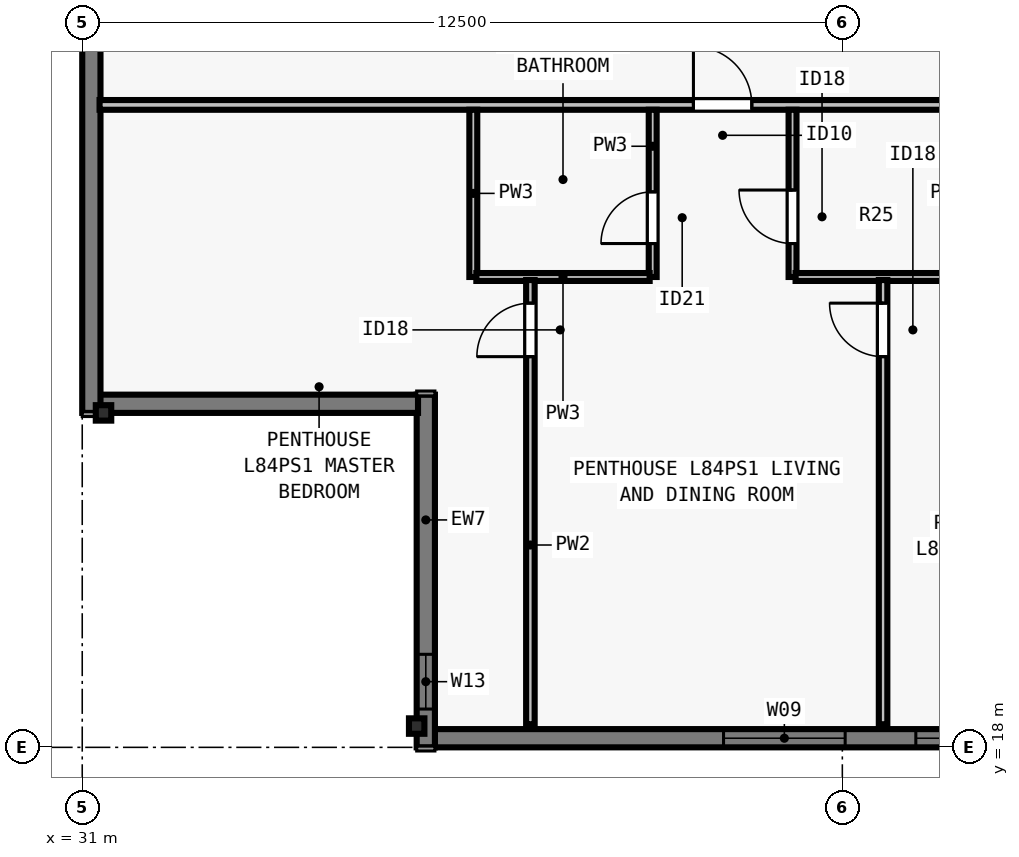
"""IFC4 building model, lengths in metres.
Left out: names, types, materials, properties, quantities, classifications, styles, units other than length and angle.
Written with IfcOpenShell. Run it as: python <this file> out.ifc"""

import sys

from ifc_helpers import new_model, si_unit, direction, frame, frame_2d, origin, origin_2d, place, context, subcontext, project, spatial, rectangle, i_section, extrude, element, fill, save


model = new_model("IFC4")
c1 = context("Model", 3, precision=1e-05, world=origin(), true_north=direction((0.0, 1.0)))
c2 = subcontext(c1, "Body", "Model", "MODEL_VIEW")
j1 = project(units=[si_unit("LENGTHUNIT", "METRE"), si_unit("PLANEANGLEUNIT", "RADIAN")], contexts=[c1])
p1 = place(None, origin())
s1 = spatial("IfcSite", under=j1, at=p1, CompositionType="ELEMENT")
p2 = place(p1, origin())
s2 = spatial("IfcBuilding", under=s1, at=p2, CompositionType="ELEMENT")
p3 = place(p2, frame((0.0, 0.0, 305.0)))
s3 = spatial("IfcBuildingStorey", under=s2, at=p3, CompositionType="ELEMENT", Elevation=305.0)
for number, where, z_axis, x_axis in (
    (1, (36.5, 18.35, 0.0), (0.0, 0.0, 1.0), (1.0, 0.0, 0.0)),
    (2, (31.35, 23.5, 0.0), (0.0, 0.0, 1.0), (0.0, 1.0, 0.0)),
):
    element("IfcColumn", number, at=place(p3, frame(where, z_axis=z_axis, x_axis=x_axis)), inside=s3, PredefinedType="COLUMN", context=c2, shape_type="SweptSolid", body=[
        extrude(i_section(OverallWidth=0.254, OverallDepth=0.254, WebThickness=0.009, FlangeThickness=0.014, FilletRadius=0.013, at=origin_2d()), origin(), (0.0, 0.0, 1.0), 3.5),
    ])
p4 = place(p3, frame((67.5, 18.15, 0.0), z_axis=(0.0, 0.0, 1.0), x_axis=(-1.0, 0.0, 0.0)))
e3 = element("IfcWall", 3, at=p4, inside=s3, PredefinedType="SOLIDWALL", context=c2, shape_type="SweptSolid", body=[
    extrude(rectangle(XDim=30.722, YDim=0.3, at=frame_2d((15.361, 0.0))), origin(), (0.0, 0.0, 1.0), 3.29),
])
p5 = place(p4, frame((4.944, 0.0, 0.8)))
e4 = element("IfcOpeningElement", 4, at=p5, cuts=e3, PredefinedType="OPENING", context=c2, shape_type="SweptSolid", body=[
    extrude(rectangle(XDim=1.65, YDim=1.758, at=frame_2d((0.825, 0.879))), frame((0.0, 0.16, 0.0), z_axis=(0.0, -1.0, 0.0), x_axis=(1.0, 0.0, 0.0)), (0.0, 0.0, 1.0), 0.32),
])
p6 = place(p4, frame((7.756, 0.0, 0.8)))
e5 = element("IfcOpeningElement", 5, at=p6, cuts=e3, PredefinedType="OPENING", context=c2, shape_type="SweptSolid", body=[
    extrude(rectangle(XDim=2.0, YDim=1.758, at=frame_2d((1.0, 0.879))), frame((0.0, 0.16, 0.0), z_axis=(0.0, -1.0, 0.0), x_axis=(1.0, 0.0, 0.0)), (0.0, 0.0, 1.0), 0.32),
])
p7 = place(p4, frame((12.617, 0.0, 0.8)))
e6 = element("IfcOpeningElement", 6, at=p7, cuts=e3, PredefinedType="OPENING", context=c2, shape_type="SweptSolid", body=[
    extrude(rectangle(XDim=1.65, YDim=1.758, at=frame_2d((0.825, 0.879))), frame((0.0, 0.16, 0.0), z_axis=(0.0, -1.0, 0.0), x_axis=(1.0, 0.0, 0.0)), (0.0, 0.0, 1.0), 0.32),
])
p8 = place(p4, frame((16.28, 0.0, 0.8)))
e7 = element("IfcOpeningElement", 7, at=p8, cuts=e3, PredefinedType="OPENING", context=c2, shape_type="SweptSolid", body=[
    extrude(rectangle(XDim=2.0, YDim=1.758, at=frame_2d((1.0, 0.879))), frame((0.0, 0.16, 0.0), z_axis=(0.0, -1.0, 0.0), x_axis=(1.0, 0.0, 0.0)), (0.0, 0.0, 1.0), 0.32),
])
p9 = place(p4, frame((21.142, 0.0, 0.8)))
e8 = element("IfcOpeningElement", 8, at=p9, cuts=e3, PredefinedType="OPENING", context=c2, shape_type="SweptSolid", body=[
    extrude(rectangle(XDim=1.65, YDim=1.758, at=frame_2d((0.825, 0.879))), frame((0.0, 0.16, 0.0), z_axis=(0.0, -1.0, 0.0), x_axis=(1.0, 0.0, 0.0)), (0.0, 0.0, 1.0), 0.32),
])
p10 = place(p4, frame((23.954, 0.0, 0.8)))
e9 = element("IfcOpeningElement", 9, at=p10, cuts=e3, PredefinedType="OPENING", context=c2, shape_type="SweptSolid", body=[
    extrude(rectangle(XDim=2.0, YDim=1.758, at=frame_2d((1.0, 0.879))), frame((0.0, 0.16, 0.0), z_axis=(0.0, -1.0, 0.0), x_axis=(1.0, 0.0, 0.0)), (0.0, 0.0, 1.0), 0.32),
])
p11 = place(p3, frame((36.65, 18.0, 0.0), z_axis=(0.0, 0.0, 1.0), x_axis=(0.0, 1.0, 0.0)))
e10 = element("IfcWall", 10, at=p11, inside=s3, PredefinedType="SOLIDWALL", context=c2, shape_type="SweptSolid", body=[
    extrude(rectangle(XDim=5.8, YDim=0.3, at=frame_2d((2.9, 0.0))), origin(), (0.0, 0.0, 1.0), 3.29),
])
p12 = place(p11, frame((0.63, 0.0, 0.8)))
e11 = element("IfcOpeningElement", 11, at=p12, cuts=e10, PredefinedType="OPENING", context=c2, shape_type="SweptSolid", body=[
    extrude(rectangle(XDim=0.9, YDim=1.75, at=frame_2d((0.45, 0.875))), frame((0.0, 0.16, 0.0), z_axis=(0.0, -1.0, 0.0), x_axis=(1.0, 0.0, 0.0)), (0.0, 0.0, 1.0), 0.32),
])
p13 = place(p3, frame((36.522, 23.65, 0.0), z_axis=(0.0, 0.0, 1.0), x_axis=(-1.0, 0.0, 0.0)))
e12 = element("IfcWall", 12, at=p13, inside=s3, PredefinedType="SOLIDWALL", context=c2, shape_type="SweptSolid", body=[
    extrude(rectangle(XDim=5.244, YDim=0.3, at=frame_2d((2.622, 0.0))), origin(), (0.0, 0.0, 1.0), 3.29),
])
p14 = place(p3, frame((31.15, 23.5, 0.0), z_axis=(0.0, 0.0, 1.0), x_axis=(0.0, 1.0, 0.0)))
e13 = element("IfcWall", 13, at=p14, inside=s3, PredefinedType="SOLIDWALL", context=c2, shape_type="SweptSolid", body=[
    extrude(rectangle(XDim=30.722, YDim=0.3, at=frame_2d((15.361, 0.0))), origin(), (0.0, 0.0, 1.0), 3.29),
])
p15 = place(p14, frame((7.756, 0.0, 0.8)))
e14 = element("IfcOpeningElement", 14, at=p15, cuts=e13, PredefinedType="OPENING", context=c2, shape_type="SweptSolid", body=[
    extrude(rectangle(XDim=2.0, YDim=1.758, at=frame_2d((1.0, 0.879))), frame((0.0, 0.16, 0.0), z_axis=(0.0, -1.0, 0.0), x_axis=(1.0, 0.0, 0.0)), (0.0, 0.0, 1.0), 0.32),
])
p16 = place(p14, frame((12.617, 0.0, 0.8)))
e15 = element("IfcOpeningElement", 15, at=p16, cuts=e13, PredefinedType="OPENING", context=c2, shape_type="SweptSolid", body=[
    extrude(rectangle(XDim=1.65, YDim=1.758, at=frame_2d((0.825, 0.879))), frame((0.0, 0.16, 0.0), z_axis=(0.0, -1.0, 0.0), x_axis=(1.0, 0.0, 0.0)), (0.0, 0.0, 1.0), 0.32),
])
p17 = place(p14, frame((16.28, 0.0, 0.8)))
e16 = element("IfcOpeningElement", 16, at=p17, cuts=e13, PredefinedType="OPENING", context=c2, shape_type="SweptSolid", body=[
    extrude(rectangle(XDim=2.0, YDim=1.758, at=frame_2d((1.0, 0.879))), frame((0.0, 0.16, 0.0), z_axis=(0.0, -1.0, 0.0), x_axis=(1.0, 0.0, 0.0)), (0.0, 0.0, 1.0), 0.32),
])
p18 = place(p14, frame((21.142, 0.0, 0.8)))
e17 = element("IfcOpeningElement", 17, at=p18, cuts=e13, PredefinedType="OPENING", context=c2, shape_type="SweptSolid", body=[
    extrude(rectangle(XDim=1.65, YDim=1.758, at=frame_2d((0.825, 0.879))), frame((0.0, 0.16, 0.0), z_axis=(0.0, -1.0, 0.0), x_axis=(1.0, 0.0, 0.0)), (0.0, 0.0, 1.0), 0.32),
])
p19 = place(p3, frame((31.285, 28.565, 0.0), z_axis=(0.0, 0.0, 1.0), x_axis=(1.0, 0.0, 0.0)))
e18 = element("IfcWall", 18, at=p19, inside=s3, PredefinedType="PARTITIONING", context=c2, shape_type="SweptSolid", body=[
    extrude(rectangle(XDim=41.43, YDim=0.16, at=frame_2d((20.715, 0.0))), origin(), (0.0, 0.0, 1.0), 3.009),
])
p20 = place(p19, frame((9.766, 0.0, 0.0)))
e19 = element("IfcOpeningElement", 19, at=p20, cuts=e18, PredefinedType="OPENING", context=c2, shape_type="SweptSolid", body=[
    extrude(rectangle(XDim=0.96, YDim=2.18, at=frame_2d((0.48, 1.09))), frame((0.0, 0.09, 0.0), z_axis=(0.0, -1.0, 0.0), x_axis=(1.0, 0.0, 0.0)), (0.0, 0.0, 1.0), 0.18),
])
p21 = place(p19, frame((30.346, 0.0, 0.0)))
e20 = element("IfcOpeningElement", 20, at=p21, cuts=e18, PredefinedType="OPENING", context=c2, shape_type="SweptSolid", body=[
    extrude(rectangle(XDim=0.96, YDim=2.18, at=frame_2d((0.48, 1.09))), frame((0.0, 0.09, 0.0), z_axis=(0.0, -1.0, 0.0), x_axis=(1.0, 0.0, 0.0)), (0.0, 0.0, 1.0), 0.18),
])
p22 = place(p3, frame((37.431, 25.735, 0.0), z_axis=(0.0, 0.0, 1.0), x_axis=(0.0, 1.0, 0.0)))
e21 = element("IfcWall", 21, at=p22, inside=s3, PredefinedType="PLUMBINGWALL", context=c2, shape_type="SweptSolid", body=[
    extrude(rectangle(XDim=2.75, YDim=0.13, at=frame_2d((1.375, 0.0))), origin(), (0.0, 0.0, 1.0), 3.29),
])
p23 = place(p3, frame((40.381, 25.735, 0.0), z_axis=(0.0, 0.0, 1.0), x_axis=(0.0, 1.0, 0.0)))
e22 = element("IfcWall", 22, at=p23, inside=s3, PredefinedType="PLUMBINGWALL", context=c2, shape_type="SweptSolid", body=[
    extrude(rectangle(XDim=2.75, YDim=0.13, at=frame_2d((1.375, 0.0))), origin(), (0.0, 0.0, 1.0), 3.29),
])
p24 = place(p23, frame((0.55, 0.0, 0.0)))
e23 = element("IfcOpeningElement", 23, at=p24, cuts=e22, PredefinedType="OPENING", context=c2, shape_type="SweptSolid", body=[
    extrude(rectangle(XDim=0.85, YDim=2.08, at=frame_2d((0.425, 1.04))), frame((0.0, 0.075, 0.0), z_axis=(0.0, -1.0, 0.0), x_axis=(1.0, 0.0, 0.0)), (0.0, 0.0, 1.0), 0.15),
])
p25 = place(p3, frame((37.481, 25.735, 0.0), z_axis=(0.0, 0.0, 1.0), x_axis=(1.0, 0.0, 0.0)))
e24 = element("IfcWall", 24, at=p25, inside=s3, PredefinedType="PLUMBINGWALL", context=c2, shape_type="SweptSolid", body=[
    extrude(rectangle(XDim=2.85, YDim=0.13, at=frame_2d((1.425, 0.0))), origin(), (0.0, 0.0, 1.0), 3.29),
])
p26 = place(p3, frame((42.681, 25.735, 0.0), z_axis=(0.0, 0.0, 1.0), x_axis=(0.0, 1.0, 0.0)))
e25 = element("IfcWall", 25, at=p26, inside=s3, PredefinedType="PLUMBINGWALL", context=c2, shape_type="SweptSolid", body=[
    extrude(rectangle(XDim=2.75, YDim=0.13, at=frame_2d((1.375, 0.0))), origin(), (0.0, 0.0, 1.0), 3.29),
])
p27 = place(p26, frame((0.55, 0.0, 0.0)))
e26 = element("IfcOpeningElement", 26, at=p27, cuts=e25, PredefinedType="OPENING", context=c2, shape_type="SweptSolid", body=[
    extrude(rectangle(XDim=0.88, YDim=2.1, at=frame_2d((0.44, 1.05))), frame((0.0, 0.075, 0.0), z_axis=(0.0, -1.0, 0.0), x_axis=(1.0, 0.0, 0.0)), (0.0, 0.0, 1.0), 0.15),
])
p28 = place(p3, frame((42.731, 25.735, 0.0), z_axis=(0.0, 0.0, 1.0), x_axis=(1.0, 0.0, 0.0)))
e27 = element("IfcWall", 27, at=p28, inside=s3, PredefinedType="PLUMBINGWALL", context=c2, shape_type="SweptSolid", body=[
    extrude(rectangle(XDim=3.15, YDim=0.13, at=frame_2d((1.575, 0.0))), origin(), (0.0, 0.0, 1.0), 3.29),
])
p29 = place(p3, frame((38.37, 18.38, 0.0), z_axis=(0.0, 0.0, 1.0), x_axis=(0.0, 1.0, 0.0)))
e28 = element("IfcWall", 28, at=p29, inside=s3, PredefinedType="PARTITIONING", context=c2, shape_type="SweptSolid", body=[
    extrude(rectangle(XDim=7.305, YDim=0.14, at=frame_2d((3.653, 0.0))), origin(), (0.0, 0.0, 1.0), 2.653),
])
p30 = place(p29, frame((6.045, 0.0, 0.0)))
e29 = element("IfcOpeningElement", 29, at=p30, cuts=e28, PredefinedType="OPENING", context=c2, shape_type="SweptSolid", body=[
    extrude(rectangle(XDim=0.88, YDim=2.1, at=frame_2d((0.44, 1.05))), frame((0.0, 0.08, 0.0), z_axis=(0.0, -1.0, 0.0), x_axis=(1.0, 0.0, 0.0)), (0.0, 0.0, 1.0), 0.16),
])
p31 = place(p3, frame((44.17, 18.38, 0.0), z_axis=(0.0, 0.0, 1.0), x_axis=(0.0, 1.0, 0.0)))
e30 = element("IfcWall", 30, at=p31, inside=s3, PredefinedType="PARTITIONING", context=c2, shape_type="SweptSolid", body=[
    extrude(rectangle(XDim=7.305, YDim=0.14, at=frame_2d((3.653, 0.0))), origin(), (0.0, 0.0, 1.0), 3.29),
])
p32 = place(p31, frame((6.045, 0.0, 0.0)))
e31 = element("IfcOpeningElement", 31, at=p32, cuts=e30, PredefinedType="OPENING", context=c2, shape_type="SweptSolid", body=[
    extrude(rectangle(XDim=0.88, YDim=2.1, at=frame_2d((0.44, 1.05))), frame((0.0, 0.08, 0.0), z_axis=(0.0, -1.0, 0.0), x_axis=(1.0, 0.0, 0.0)), (0.0, 0.0, 1.0), 0.16),
])
p33 = place(p9, origin())
e32 = element("IfcWindow", 32, at=p33, inside=s3, PartitioningType="SINGLE_PANEL", PredefinedType="WINDOW", context=c2, shape_type="SweptSolid", body=[
    extrude(rectangle(XDim=1.65, YDim=1.758, at=frame_2d((0.825, 0.879))), frame((0.0, -0.05, 0.0), z_axis=(0.0, -1.0, 0.0), x_axis=(1.0, 0.0, 0.0)), (0.0, 0.0, 1.0), 0.06),
])
fill(e8, e32)
p34 = place(p10, origin())
e33 = element("IfcWindow", 33, at=p34, inside=s3, PartitioningType="SINGLE_PANEL", PredefinedType="WINDOW", context=c2, shape_type="SweptSolid", body=[
    extrude(rectangle(XDim=2.0, YDim=1.758, at=frame_2d((1.0, 0.879))), frame((0.0, -0.05, 0.0), z_axis=(0.0, -1.0, 0.0), x_axis=(1.0, 0.0, 0.0)), (0.0, 0.0, 1.0), 0.06),
])
fill(e9, e33)
p35 = place(p12, origin())
e34 = element("IfcWindow", 34, at=p35, inside=s3, PartitioningType="SINGLE_PANEL", PredefinedType="WINDOW", context=c2, shape_type="SweptSolid", body=[
    extrude(rectangle(XDim=0.9, YDim=1.75, at=frame_2d((0.45, 0.875))), frame((0.0, -0.04, 0.0), z_axis=(0.0, -1.0, 0.0), x_axis=(1.0, 0.0, 0.0)), (0.0, 0.0, 1.0), 0.06),
])
fill(e11, e34)
p36 = place(p24, origin())
e35 = element("IfcDoor", 35, at=p36, inside=s3, OperationType="SINGLE_SWING_LEFT", PredefinedType="DOOR", context=c2, shape_type="SweptSolid", body=[
    extrude(rectangle(XDim=0.85, YDim=2.08, at=frame_2d((0.425, 1.04))), frame((0.0, 0.025, 0.0), z_axis=(0.0, -1.0, 0.0), x_axis=(1.0, 0.0, 0.0)), (0.0, 0.0, 1.0), 0.05),
])
fill(e23, e35)
p37 = place(p27, origin())
e36 = element("IfcDoor", 36, at=p37, inside=s3, OperationType="SINGLE_SWING_RIGHT", PredefinedType="DOOR", context=c2, shape_type="SweptSolid", body=[
    extrude(rectangle(XDim=0.88, YDim=2.1, at=frame_2d((0.44, 1.05))), frame((0.0, 0.025, 0.0), z_axis=(0.0, -1.0, 0.0), x_axis=(1.0, 0.0, 0.0)), (0.0, 0.0, 1.0), 0.05),
])
fill(e26, e36)
p38 = place(p30, origin())
e37 = element("IfcDoor", 37, at=p38, inside=s3, OperationType="SINGLE_SWING_LEFT", PredefinedType="DOOR", context=c2, shape_type="SweptSolid", body=[
    extrude(rectangle(XDim=0.88, YDim=2.1, at=frame_2d((0.44, 1.05))), frame((0.0, 0.025, 0.0), z_axis=(0.0, -1.0, 0.0), x_axis=(1.0, 0.0, 0.0)), (0.0, 0.0, 1.0), 0.05),
])
fill(e29, e37)
p39 = place(p32, origin())
e38 = element("IfcDoor", 38, at=p39, inside=s3, OperationType="SINGLE_SWING_RIGHT", PredefinedType="DOOR", context=c2, shape_type="SweptSolid", body=[
    extrude(rectangle(XDim=0.88, YDim=2.1, at=frame_2d((0.44, 1.05))), frame((0.0, 0.025, 0.0), z_axis=(0.0, -1.0, 0.0), x_axis=(1.0, 0.0, 0.0)), (0.0, 0.0, 1.0), 0.05),
])
fill(e31, e38)
p40 = place(p20, origin())
e39 = element("IfcDoor", 39, at=p40, inside=s3, OperationType="SINGLE_SWING_LEFT", PredefinedType="DOOR", context=c2, shape_type="SweptSolid", body=[
    extrude(rectangle(XDim=0.96, YDim=2.18, at=frame_2d((0.48, 1.09))), frame((0.0, 0.025, 0.0), z_axis=(0.0, -1.0, 0.0), x_axis=(1.0, 0.0, 0.0)), (0.0, 0.0, 1.0), 0.05),
])
fill(e19, e39)
save(model, sys.argv[1])
